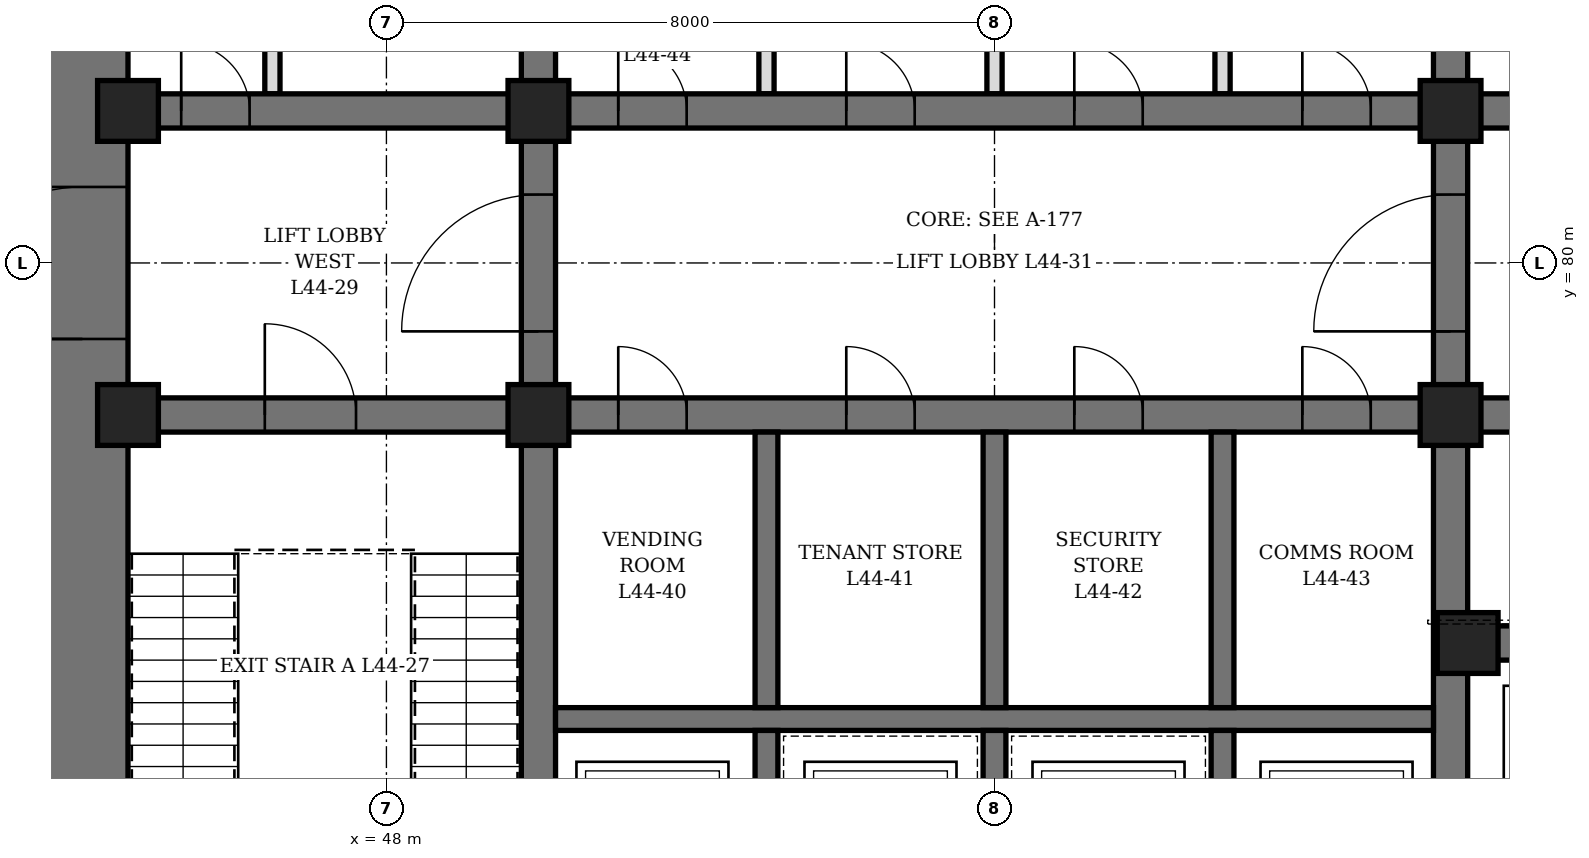
"""IFC4 building model, lengths in metres.
Left out: names, types, materials, properties, quantities, classifications, styles, units other than length and angle.
Written with IfcOpenShell. Run it as: python <this file> out.ifc"""

import sys

from ifc_helpers import new_model, si_unit, direction, frame, frame_2d, origin, origin_2d, place, context, subcontext, project, spatial, rectangle, hollow_rectangle, extrude, element, fill, save


model = new_model("IFC4")
c1 = context("Model", 3, precision=1e-05, world=origin(), true_north=direction((0.0, 1.0)))
c2 = subcontext(c1, "Body", "Model", "MODEL_VIEW")
j1 = project(units=[si_unit("LENGTHUNIT", "METRE"), si_unit("PLANEANGLEUNIT", "RADIAN")], contexts=[c1])
p1 = place(None, origin())
s1 = spatial("IfcSite", under=j1, at=p1, CompositionType="ELEMENT")
p2 = place(p1, origin())
s2 = spatial("IfcBuilding", under=s1, at=p2, CompositionType="ELEMENT")
p3 = place(p2, frame((0.0, 0.0, 198.1)))
s3 = spatial("IfcBuildingStorey", under=s2, at=p3, CompositionType="ELEMENT", Elevation=198.1)
p4 = place(p3, frame((44.0, 70.4, 0.0), z_axis=(0.0, 0.0, 1.0), x_axis=(0.0, 1.0, 0.0)))
e1 = element("IfcWall", 1, at=p4, inside=s3, PredefinedType="SHEAR", context=c2, shape_type="SweptSolid", body=[
    extrude(rectangle(XDim=19.2, YDim=1.2, at=frame_2d((9.6, 0.0))), origin(), (0.0, 0.0, 1.0), 4.2),
])
p5 = place(p4, frame((8.6, 0.0, 0.0)))
e2 = element("IfcOpeningElement", 2, at=p5, cuts=e1, PredefinedType="OPENING", context=c2, shape_type="SweptSolid", body=[
    extrude(rectangle(XDim=2.0, YDim=2.4, at=frame_2d((1.0, 1.2))), frame((0.0, 0.61, 0.0), z_axis=(0.0, -1.0, 0.0), x_axis=(1.0, 0.0, 0.0)), (0.0, 0.0, 1.0), 1.22),
])
p6 = place(p3, frame((50.0, 71.6, 0.0), z_axis=(0.0, 0.0, 1.0), x_axis=(0.0, 1.0, 0.0)))
e3 = element("IfcWall", 3, at=p6, inside=s3, PredefinedType="SHEAR", context=c2, shape_type="SweptSolid", body=[
    extrude(rectangle(XDim=16.8, YDim=0.45, at=frame_2d((8.4, 0.0))), origin(), (0.0, 0.0, 1.0), 4.2),
])
p7 = place(p6, frame((7.5, 0.0, 0.0)))
e4 = element("IfcOpeningElement", 4, at=p7, cuts=e3, PredefinedType="OPENING", context=c2, shape_type="SweptSolid", body=[
    extrude(rectangle(XDim=1.8, YDim=2.4, at=frame_2d((0.9, 1.2))), frame((0.0, 0.235, 0.0), z_axis=(0.0, -1.0, 0.0), x_axis=(1.0, 0.0, 0.0)), (0.0, 0.0, 1.0), 0.47),
])
p8 = place(p3, frame((62.0, 71.6, 0.0), z_axis=(0.0, 0.0, 1.0), x_axis=(0.0, 1.0, 0.0)))
e5 = element("IfcWall", 5, at=p8, inside=s3, PredefinedType="SHEAR", context=c2, shape_type="SweptSolid", body=[
    extrude(rectangle(XDim=16.8, YDim=0.45, at=frame_2d((8.4, 0.0))), origin(), (0.0, 0.0, 1.0), 4.2),
])
p9 = place(p8, frame((7.5, 0.0, 0.0)))
e6 = element("IfcOpeningElement", 6, at=p9, cuts=e5, PredefinedType="OPENING", context=c2, shape_type="SweptSolid", body=[
    extrude(rectangle(XDim=1.8, YDim=2.4, at=frame_2d((0.9, 1.2))), frame((0.0, 0.235, 0.0), z_axis=(0.0, -1.0, 0.0), x_axis=(1.0, 0.0, 0.0)), (0.0, 0.0, 1.0), 0.47),
])
p10 = place(p3, frame((44.6, 78.0, 0.0), z_axis=(0.0, 0.0, 1.0), x_axis=(1.0, 0.0, 0.0)))
e7 = element("IfcWall", 7, at=p10, inside=s3, PredefinedType="SHEAR", context=c2, shape_type="SweptSolid", body=[
    extrude(rectangle(XDim=5.175, YDim=0.45, at=frame_2d((2.587, 0.0))), origin(), (0.0, 0.0, 1.0), 4.2),
])
p11 = place(p10, frame((1.8, 0.0, 0.0)))
e8 = element("IfcOpeningElement", 8, at=p11, cuts=e7, PredefinedType="OPENING", context=c2, shape_type="SweptSolid", body=[
    extrude(rectangle(XDim=1.2, YDim=2.1, at=frame_2d((0.6, 1.05))), frame((0.0, 0.235, 0.0), z_axis=(0.0, -1.0, 0.0), x_axis=(1.0, 0.0, 0.0)), (0.0, 0.0, 1.0), 0.47),
])
p12 = place(p3, frame((44.6, 82.0, 0.0), z_axis=(0.0, 0.0, 1.0), x_axis=(1.0, 0.0, 0.0)))
e9 = element("IfcWall", 9, at=p12, inside=s3, PredefinedType="SHEAR", context=c2, shape_type="SweptSolid", body=[
    extrude(rectangle(XDim=5.175, YDim=0.45, at=frame_2d((2.587, 0.0))), origin(), (0.0, 0.0, 1.0), 4.2),
])
p13 = place(p12, frame((0.7, 0.0, 0.0)))
e10 = element("IfcOpeningElement", 10, at=p13, cuts=e9, PredefinedType="OPENING", context=c2, shape_type="SweptSolid", body=[
    extrude(rectangle(XDim=0.9, YDim=2.1, at=frame_2d((0.45, 1.05))), frame((0.0, 0.235, 0.0), z_axis=(0.0, -1.0, 0.0), x_axis=(1.0, 0.0, 0.0)), (0.0, 0.0, 1.0), 0.47),
])
p14 = place(p3, frame((62.225, 75.0, 0.0), z_axis=(0.0, 0.0, 1.0), x_axis=(1.0, 0.0, 0.0)))
e11 = element("IfcWall", 11, at=p14, inside=s3, PredefinedType="SHEAR", context=c2, shape_type="SweptSolid", body=[
    extrude(rectangle(XDim=5.175, YDim=0.45, at=frame_2d((2.587, 0.0))), origin(), (0.0, 0.0, 1.0), 4.2),
])
p15 = place(p14, frame((0.675, 0.0, 0.0)))
e12 = element("IfcOpeningElement", 12, at=p15, cuts=e11, PredefinedType="OPENING", context=c2, shape_type="SweptSolid", body=[
    extrude(rectangle(XDim=1.2, YDim=2.2, at=frame_2d((0.6, 1.1))), frame((0.0, 0.235, 0.0), z_axis=(0.0, -1.0, 0.0), x_axis=(1.0, 0.0, 0.0)), (0.0, 0.0, 1.0), 0.47),
])
p16 = place(p14, frame((3.425, 0.0, 0.0)))
e13 = element("IfcOpeningElement", 13, at=p16, cuts=e11, PredefinedType="OPENING", context=c2, shape_type="SweptSolid", body=[
    extrude(rectangle(XDim=1.2, YDim=2.2, at=frame_2d((0.6, 1.1))), frame((0.0, 0.235, 0.0), z_axis=(0.0, -1.0, 0.0), x_axis=(1.0, 0.0, 0.0)), (0.0, 0.0, 1.0), 0.47),
])
p17 = place(p3, frame((62.225, 78.0, 0.0), z_axis=(0.0, 0.0, 1.0), x_axis=(1.0, 0.0, 0.0)))
e14 = element("IfcWall", 14, at=p17, inside=s3, PredefinedType="SHEAR", context=c2, shape_type="SweptSolid", body=[
    extrude(rectangle(XDim=5.175, YDim=0.45, at=frame_2d((2.587, 0.0))), origin(), (0.0, 0.0, 1.0), 4.2),
])
p18 = place(p17, frame((2.175, 0.0, 0.0)))
e15 = element("IfcOpeningElement", 15, at=p18, cuts=e14, PredefinedType="OPENING", context=c2, shape_type="SweptSolid", body=[
    extrude(rectangle(XDim=1.2, YDim=2.1, at=frame_2d((0.6, 1.05))), frame((0.0, 0.235, 0.0), z_axis=(0.0, -1.0, 0.0), x_axis=(1.0, 0.0, 0.0)), (0.0, 0.0, 1.0), 0.47),
])
p19 = place(p3, frame((62.225, 82.0, 0.0), z_axis=(0.0, 0.0, 1.0), x_axis=(1.0, 0.0, 0.0)))
e16 = element("IfcWall", 16, at=p19, inside=s3, PredefinedType="SHEAR", context=c2, shape_type="SweptSolid", body=[
    extrude(rectangle(XDim=5.175, YDim=0.45, at=frame_2d((2.587, 0.0))), origin(), (0.0, 0.0, 1.0), 4.2),
])
p20 = place(p19, frame((2.175, 0.0, 0.0)))
e17 = element("IfcOpeningElement", 17, at=p20, cuts=e16, PredefinedType="OPENING", context=c2, shape_type="SweptSolid", body=[
    extrude(rectangle(XDim=1.2, YDim=2.1, at=frame_2d((0.6, 1.05))), frame((0.0, 0.235, 0.0), z_axis=(0.0, -1.0, 0.0), x_axis=(1.0, 0.0, 0.0)), (0.0, 0.0, 1.0), 0.47),
])
p21 = place(p3, frame((50.225, 78.0, 0.0), z_axis=(0.0, 0.0, 1.0), x_axis=(1.0, 0.0, 0.0)))
e18 = element("IfcWall", 18, at=p21, inside=s3, PredefinedType="SHEAR", context=c2, shape_type="SweptSolid", body=[
    extrude(rectangle(XDim=11.55, YDim=0.45, at=frame_2d((5.775, 0.0))), origin(), (0.0, 0.0, 1.0), 4.2),
])
p22 = place(p21, frame((0.825, 0.0, 0.0)))
e19 = element("IfcOpeningElement", 19, at=p22, cuts=e18, PredefinedType="OPENING", context=c2, shape_type="SweptSolid", body=[
    extrude(rectangle(XDim=0.9, YDim=2.1, at=frame_2d((0.45, 1.05))), frame((0.0, 0.235, 0.0), z_axis=(0.0, -1.0, 0.0), x_axis=(1.0, 0.0, 0.0)), (0.0, 0.0, 1.0), 0.47),
])
p23 = place(p21, frame((3.825, 0.0, 0.0)))
e20 = element("IfcOpeningElement", 20, at=p23, cuts=e18, PredefinedType="OPENING", context=c2, shape_type="SweptSolid", body=[
    extrude(rectangle(XDim=0.9, YDim=2.1, at=frame_2d((0.45, 1.05))), frame((0.0, 0.235, 0.0), z_axis=(0.0, -1.0, 0.0), x_axis=(1.0, 0.0, 0.0)), (0.0, 0.0, 1.0), 0.47),
])
p24 = place(p21, frame((6.825, 0.0, 0.0)))
e21 = element("IfcOpeningElement", 21, at=p24, cuts=e18, PredefinedType="OPENING", context=c2, shape_type="SweptSolid", body=[
    extrude(rectangle(XDim=0.9, YDim=2.1, at=frame_2d((0.45, 1.05))), frame((0.0, 0.235, 0.0), z_axis=(0.0, -1.0, 0.0), x_axis=(1.0, 0.0, 0.0)), (0.0, 0.0, 1.0), 0.47),
])
p25 = place(p21, frame((9.825, 0.0, 0.0)))
e22 = element("IfcOpeningElement", 22, at=p25, cuts=e18, PredefinedType="OPENING", context=c2, shape_type="SweptSolid", body=[
    extrude(rectangle(XDim=0.9, YDim=2.1, at=frame_2d((0.45, 1.05))), frame((0.0, 0.235, 0.0), z_axis=(0.0, -1.0, 0.0), x_axis=(1.0, 0.0, 0.0)), (0.0, 0.0, 1.0), 0.47),
])
p26 = place(p3, frame((50.225, 82.0, 0.0), z_axis=(0.0, 0.0, 1.0), x_axis=(1.0, 0.0, 0.0)))
e23 = element("IfcWall", 23, at=p26, inside=s3, PredefinedType="SHEAR", context=c2, shape_type="SweptSolid", body=[
    extrude(rectangle(XDim=11.55, YDim=0.45, at=frame_2d((5.775, 0.0))), origin(), (0.0, 0.0, 1.0), 4.2),
])
p27 = place(p26, frame((0.825, 0.0, 0.0)))
e24 = element("IfcOpeningElement", 24, at=p27, cuts=e23, PredefinedType="OPENING", context=c2, shape_type="SweptSolid", body=[
    extrude(rectangle(XDim=0.9, YDim=2.1, at=frame_2d((0.45, 1.05))), frame((0.0, 0.235, 0.0), z_axis=(0.0, -1.0, 0.0), x_axis=(1.0, 0.0, 0.0)), (0.0, 0.0, 1.0), 0.47),
])
p28 = place(p26, frame((3.825, 0.0, 0.0)))
e25 = element("IfcOpeningElement", 25, at=p28, cuts=e23, PredefinedType="OPENING", context=c2, shape_type="SweptSolid", body=[
    extrude(rectangle(XDim=0.9, YDim=2.1, at=frame_2d((0.45, 1.05))), frame((0.0, 0.235, 0.0), z_axis=(0.0, -1.0, 0.0), x_axis=(1.0, 0.0, 0.0)), (0.0, 0.0, 1.0), 0.47),
])
p29 = place(p26, frame((6.825, 0.0, 0.0)))
e26 = element("IfcOpeningElement", 26, at=p29, cuts=e23, PredefinedType="OPENING", context=c2, shape_type="SweptSolid", body=[
    extrude(rectangle(XDim=0.9, YDim=2.1, at=frame_2d((0.45, 1.05))), frame((0.0, 0.235, 0.0), z_axis=(0.0, -1.0, 0.0), x_axis=(1.0, 0.0, 0.0)), (0.0, 0.0, 1.0), 0.47),
])
p30 = place(p26, frame((9.825, 0.0, 0.0)))
e27 = element("IfcOpeningElement", 27, at=p30, cuts=e23, PredefinedType="OPENING", context=c2, shape_type="SweptSolid", body=[
    extrude(rectangle(XDim=0.9, YDim=2.1, at=frame_2d((0.45, 1.05))), frame((0.0, 0.235, 0.0), z_axis=(0.0, -1.0, 0.0), x_axis=(1.0, 0.0, 0.0)), (0.0, 0.0, 1.0), 0.47),
])
p31 = place(p3, frame((50.225, 74.0, 0.0), z_axis=(0.0, 0.0, 1.0), x_axis=(1.0, 0.0, 0.0)))
e28 = element("IfcWall", 28, at=p31, inside=s3, PredefinedType="SHEAR", context=c2, shape_type="SweptSolid", body=[
    extrude(rectangle(XDim=11.55, YDim=0.3, at=frame_2d((5.775, 0.0))), origin(), (0.0, 0.0, 1.0), 4.2),
])
p32 = place(p3, frame((53.0, 71.6, 0.0), z_axis=(0.0, 0.0, 1.0), x_axis=(0.0, 1.0, 0.0)))
e29 = element("IfcWall", 29, at=p32, inside=s3, PredefinedType="SHEAR", context=c2, shape_type="SweptSolid", body=[
    extrude(rectangle(XDim=2.25, YDim=0.3, at=frame_2d((1.125, 0.0))), origin(), (0.0, 0.0, 1.0), 4.2),
])
p33 = place(p3, frame((53.0, 74.15, 0.0), z_axis=(0.0, 0.0, 1.0), x_axis=(0.0, 1.0, 0.0)))
e30 = element("IfcWall", 30, at=p33, inside=s3, PredefinedType="SHEAR", context=c2, shape_type="SweptSolid", body=[
    extrude(rectangle(XDim=3.625, YDim=0.3, at=frame_2d((1.812, 0.0))), origin(), (0.0, 0.0, 1.0), 4.2),
])
p34 = place(p3, frame((56.0, 71.6, 0.0), z_axis=(0.0, 0.0, 1.0), x_axis=(0.0, 1.0, 0.0)))
e31 = element("IfcWall", 31, at=p34, inside=s3, PredefinedType="SHEAR", context=c2, shape_type="SweptSolid", body=[
    extrude(rectangle(XDim=2.25, YDim=0.3, at=frame_2d((1.125, 0.0))), origin(), (0.0, 0.0, 1.0), 4.2),
])
p35 = place(p3, frame((56.0, 74.15, 0.0), z_axis=(0.0, 0.0, 1.0), x_axis=(0.0, 1.0, 0.0)))
e32 = element("IfcWall", 32, at=p35, inside=s3, PredefinedType="SHEAR", context=c2, shape_type="SweptSolid", body=[
    extrude(rectangle(XDim=3.625, YDim=0.3, at=frame_2d((1.812, 0.0))), origin(), (0.0, 0.0, 1.0), 4.2),
])
p36 = place(p3, frame((59.0, 71.6, 0.0), z_axis=(0.0, 0.0, 1.0), x_axis=(0.0, 1.0, 0.0)))
e33 = element("IfcWall", 33, at=p36, inside=s3, PredefinedType="SHEAR", context=c2, shape_type="SweptSolid", body=[
    extrude(rectangle(XDim=2.25, YDim=0.3, at=frame_2d((1.125, 0.0))), origin(), (0.0, 0.0, 1.0), 4.2),
])
p37 = place(p3, frame((59.0, 74.15, 0.0), z_axis=(0.0, 0.0, 1.0), x_axis=(0.0, 1.0, 0.0)))
e34 = element("IfcWall", 34, at=p37, inside=s3, PredefinedType="SHEAR", context=c2, shape_type="SweptSolid", body=[
    extrude(rectangle(XDim=3.625, YDim=0.3, at=frame_2d((1.812, 0.0))), origin(), (0.0, 0.0, 1.0), 4.2),
])
for number, where, z_axis, x_axis in (
    (35, (44.6, 78.0, 0.0), (0.0, 0.0, 1.0), (1.0, 0.0, 0.0)),
    (36, (44.6, 82.0, 0.0), (0.0, 0.0, 1.0), (1.0, 0.0, 0.0)),
    (37, (50.0, 78.0, 0.0), (0.0, 0.0, 1.0), (1.0, 0.0, 0.0)),
    (38, (50.0, 82.0, 0.0), (0.0, 0.0, 1.0), (1.0, 0.0, 0.0)),
    (39, (62.0, 78.0, 0.0), (0.0, 0.0, 1.0), (1.0, 0.0, 0.0)),
    (40, (62.0, 82.0, 0.0), (0.0, 0.0, 1.0), (1.0, 0.0, 0.0)),
    (41, (62.225, 75.0, 0.0), (0.0, 0.0, 1.0), (1.0, 0.0, 0.0)),
):
    element("IfcColumn", number, at=place(p3, frame(where, z_axis=z_axis, x_axis=x_axis)), inside=s3, PredefinedType="COLUMN", context=c2, shape_type="SweptSolid", body=[
        extrude(hollow_rectangle(XDim=0.8, YDim=0.8, WallThickness=0.1, at=origin_2d()), origin(), (0.0, 0.0, 1.0), 4.2),
    ])
p38 = place(p3, frame((46.5, 82.225, 0.0), z_axis=(0.0, 0.0, 1.0), x_axis=(0.0, 1.0, 0.0)))
e42 = element("IfcWall", 42, at=p38, inside=s3, PredefinedType="PARTITIONING", context=c2, shape_type="SweptSolid", body=[
    extrude(rectangle(XDim=3.05, YDim=0.2, at=frame_2d((1.525, 0.0))), origin(), (0.0, 0.0, 1.0), 4.04),
])
p39 = place(p38, frame((1.075, 0.0, 0.0)))
e43 = element("IfcOpeningElement", 43, at=p39, cuts=e42, PredefinedType="OPENING", context=c2, shape_type="SweptSolid", body=[
    extrude(rectangle(XDim=0.9, YDim=2.1, at=frame_2d((0.45, 1.05))), frame((0.0, 0.11, 0.0), z_axis=(0.0, -1.0, 0.0), x_axis=(1.0, 0.0, 0.0)), (0.0, 0.0, 1.0), 0.22),
])
p40 = place(p3, frame((53.0, 82.225, 0.0), z_axis=(0.0, 0.0, 1.0), x_axis=(0.0, 1.0, 0.0)))
e44 = element("IfcWall", 44, at=p40, inside=s3, PredefinedType="PARTITIONING", context=c2, shape_type="SweptSolid", body=[
    extrude(rectangle(XDim=3.55, YDim=0.2, at=frame_2d((1.775, 0.0))), origin(), (0.0, 0.0, 1.0), 4.04),
])
p41 = place(p3, frame((56.0, 82.225, 0.0), z_axis=(0.0, 0.0, 1.0), x_axis=(0.0, 1.0, 0.0)))
e45 = element("IfcWall", 45, at=p41, inside=s3, PredefinedType="PARTITIONING", context=c2, shape_type="SweptSolid", body=[
    extrude(rectangle(XDim=3.55, YDim=0.2, at=frame_2d((1.775, 0.0))), origin(), (0.0, 0.0, 1.0), 3.14),
])
p42 = place(p3, frame((59.0, 82.225, 0.0), z_axis=(0.0, 0.0, 1.0), x_axis=(0.0, 1.0, 0.0)))
e46 = element("IfcWall", 46, at=p42, inside=s3, PredefinedType="PARTITIONING", context=c2, shape_type="SweptSolid", body=[
    extrude(rectangle(XDim=3.55, YDim=0.2, at=frame_2d((1.775, 0.0))), origin(), (0.0, 0.0, 1.0), 4.04),
])
p43 = place(p13, origin())
e47 = element("IfcDoor", 47, at=p43, inside=s3, OperationType="SINGLE_SWING_LEFT", PredefinedType="DOOR", context=c2, shape_type="SweptSolid", body=[
    extrude(rectangle(XDim=0.9, YDim=2.1, at=frame_2d((0.45, 1.05))), frame((0.0, 0.225, 0.0), z_axis=(0.0, -1.0, 0.0), x_axis=(1.0, 0.0, 0.0)), (0.0, 0.0, 1.0), 0.449),
])
fill(e10, e47)
p44 = place(p22, origin())
e48 = element("IfcDoor", 48, at=p44, inside=s3, OperationType="SINGLE_SWING_LEFT", PredefinedType="DOOR", context=c2, shape_type="SweptSolid", body=[
    extrude(rectangle(XDim=0.9, YDim=2.1, at=frame_2d((0.45, 1.05))), frame((0.0, 0.225, 0.0), z_axis=(0.0, -1.0, 0.0), x_axis=(1.0, 0.0, 0.0)), (0.0, 0.0, 1.0), 0.449),
])
fill(e19, e48)
p45 = place(p23, origin())
e49 = element("IfcDoor", 49, at=p45, inside=s3, OperationType="SINGLE_SWING_LEFT", PredefinedType="DOOR", context=c2, shape_type="SweptSolid", body=[
    extrude(rectangle(XDim=0.9, YDim=2.1, at=frame_2d((0.45, 1.05))), frame((0.0, 0.225, 0.0), z_axis=(0.0, -1.0, 0.0), x_axis=(1.0, 0.0, 0.0)), (0.0, 0.0, 1.0), 0.449),
])
fill(e20, e49)
p46 = place(p24, origin())
e50 = element("IfcDoor", 50, at=p46, inside=s3, OperationType="SINGLE_SWING_LEFT", PredefinedType="DOOR", context=c2, shape_type="SweptSolid", body=[
    extrude(rectangle(XDim=0.9, YDim=2.1, at=frame_2d((0.45, 1.05))), frame((0.0, 0.225, 0.0), z_axis=(0.0, -1.0, 0.0), x_axis=(1.0, 0.0, 0.0)), (0.0, 0.0, 1.0), 0.449),
])
fill(e21, e50)
p47 = place(p25, origin())
e51 = element("IfcDoor", 51, at=p47, inside=s3, OperationType="SINGLE_SWING_LEFT", PredefinedType="DOOR", context=c2, shape_type="SweptSolid", body=[
    extrude(rectangle(XDim=0.9, YDim=2.1, at=frame_2d((0.45, 1.05))), frame((0.0, 0.225, 0.0), z_axis=(0.0, -1.0, 0.0), x_axis=(1.0, 0.0, 0.0)), (0.0, 0.0, 1.0), 0.449),
])
fill(e22, e51)
p48 = place(p27, origin())
e52 = element("IfcDoor", 52, at=p48, inside=s3, OperationType="SINGLE_SWING_LEFT", PredefinedType="DOOR", context=c2, shape_type="SweptSolid", body=[
    extrude(rectangle(XDim=0.9, YDim=2.1, at=frame_2d((0.45, 1.05))), frame((0.0, 0.225, 0.0), z_axis=(0.0, -1.0, 0.0), x_axis=(1.0, 0.0, 0.0)), (0.0, 0.0, 1.0), 0.449),
])
fill(e24, e52)
p49 = place(p28, origin())
e53 = element("IfcDoor", 53, at=p49, inside=s3, OperationType="SINGLE_SWING_LEFT", PredefinedType="DOOR", context=c2, shape_type="SweptSolid", body=[
    extrude(rectangle(XDim=0.9, YDim=2.1, at=frame_2d((0.45, 1.05))), frame((0.0, 0.225, 0.0), z_axis=(0.0, -1.0, 0.0), x_axis=(1.0, 0.0, 0.0)), (0.0, 0.0, 1.0), 0.449),
])
fill(e25, e53)
p50 = place(p29, origin())
e54 = element("IfcDoor", 54, at=p50, inside=s3, OperationType="SINGLE_SWING_LEFT", PredefinedType="DOOR", context=c2, shape_type="SweptSolid", body=[
    extrude(rectangle(XDim=0.9, YDim=2.1, at=frame_2d((0.45, 1.05))), frame((0.0, 0.225, 0.0), z_axis=(0.0, -1.0, 0.0), x_axis=(1.0, 0.0, 0.0)), (0.0, 0.0, 1.0), 0.449),
])
fill(e26, e54)
p51 = place(p30, origin())
e55 = element("IfcDoor", 55, at=p51, inside=s3, OperationType="SINGLE_SWING_LEFT", PredefinedType="DOOR", context=c2, shape_type="SweptSolid", body=[
    extrude(rectangle(XDim=0.9, YDim=2.1, at=frame_2d((0.45, 1.05))), frame((0.0, 0.225, 0.0), z_axis=(0.0, -1.0, 0.0), x_axis=(1.0, 0.0, 0.0)), (0.0, 0.0, 1.0), 0.449),
])
fill(e27, e55)
p52 = place(p11, origin())
e56 = element("IfcDoor", 56, at=p52, inside=s3, OperationType="SINGLE_SWING_LEFT", PredefinedType="DOOR", context=c2, shape_type="SweptSolid", body=[
    extrude(rectangle(XDim=1.2, YDim=2.1, at=frame_2d((0.6, 1.05))), frame((0.0, 0.225, 0.0), z_axis=(0.0, -1.0, 0.0), x_axis=(1.0, 0.0, 0.0)), (0.0, 0.0, 1.0), 0.449),
])
fill(e8, e56)
p53 = place(p5, origin())
e57 = element("IfcDoor", 57, at=p53, inside=s3, OperationType="DOUBLE_DOOR_SINGLE_SWING", PredefinedType="DOOR", context=c2, shape_type="SweptSolid", body=[
    extrude(rectangle(XDim=2.0, YDim=2.4, at=frame_2d((1.0, 1.2))), frame((0.0, 0.35, 0.0), z_axis=(0.0, -1.0, 0.0), x_axis=(1.0, 0.0, 0.0)), (0.0, 0.0, 1.0), 0.7),
])
fill(e2, e57)
p54 = place(p7, origin())
e58 = element("IfcDoor", 58, at=p54, inside=s3, OperationType="DOUBLE_DOOR_SINGLE_SWING", PredefinedType="DOOR", context=c2, shape_type="SweptSolid", body=[
    extrude(rectangle(XDim=1.8, YDim=2.4, at=frame_2d((0.9, 1.2))), frame((0.0, 0.225, 0.0), z_axis=(0.0, -1.0, 0.0), x_axis=(1.0, 0.0, 0.0)), (0.0, 0.0, 1.0), 0.449),
])
fill(e4, e58)
p55 = place(p9, origin())
e59 = element("IfcDoor", 59, at=p55, inside=s3, OperationType="DOUBLE_DOOR_SINGLE_SWING", PredefinedType="DOOR", context=c2, shape_type="SweptSolid", body=[
    extrude(rectangle(XDim=1.8, YDim=2.4, at=frame_2d((0.9, 1.2))), frame((0.0, 0.225, 0.0), z_axis=(0.0, -1.0, 0.0), x_axis=(1.0, 0.0, 0.0)), (0.0, 0.0, 1.0), 0.449),
])
fill(e6, e59)
save(model, sys.argv[1])
